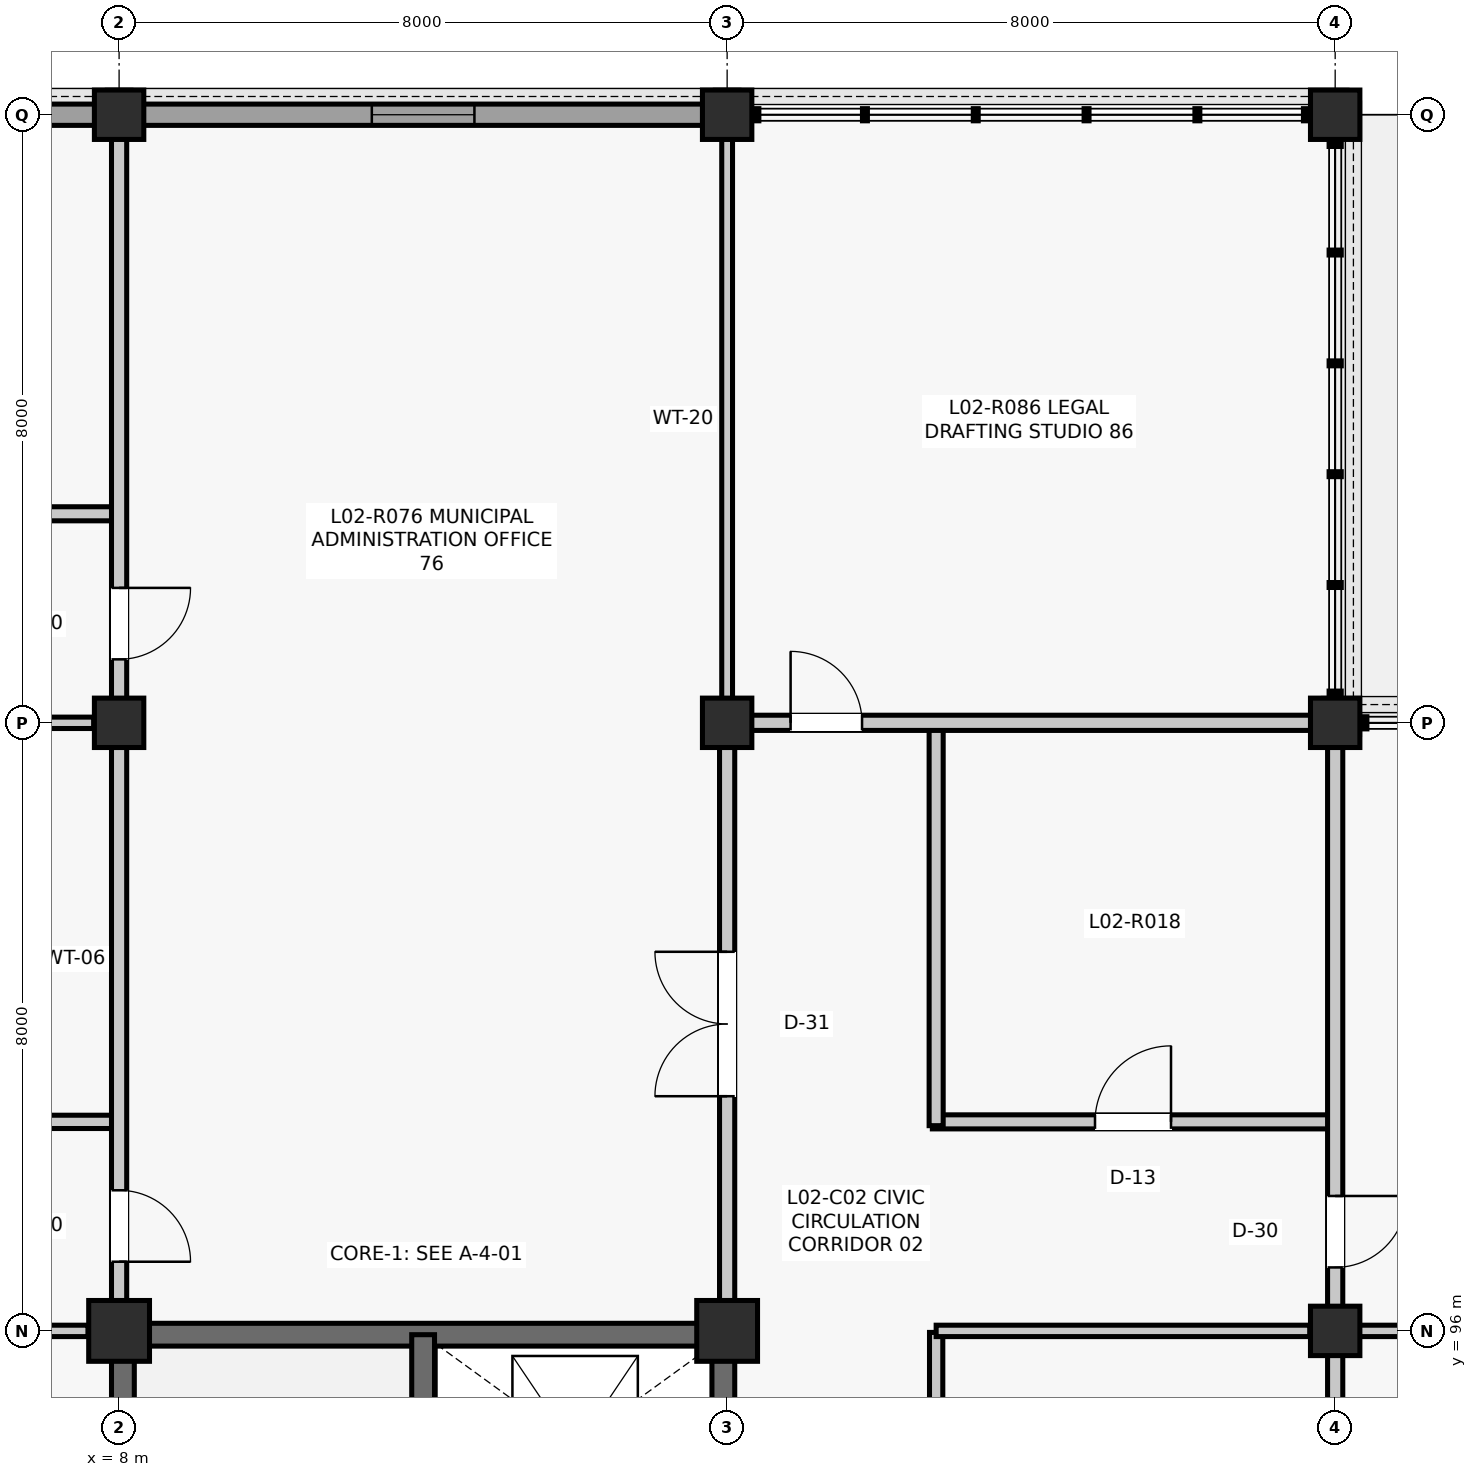
"""IFC4 building model, lengths in metres.
Left out: names, types, materials, properties, quantities, classifications, styles, units other than length and angle.
Written with IfcOpenShell. Run it as: python <this file> out.ifc"""

import sys

from ifc_helpers import new_model, si_unit, direction, frame, frame_2d, origin, origin_2d, place, context, subcontext, project, spatial, rectangle, extrude, element, fill, save


model = new_model("IFC4")
c1 = context("Model", 3, precision=1e-05, world=origin(), true_north=direction((0.0, 1.0)))
c2 = subcontext(c1, "Body", "Model", "MODEL_VIEW")
j1 = project(units=[si_unit("LENGTHUNIT", "METRE"), si_unit("PLANEANGLEUNIT", "RADIAN")], contexts=[c1])
p1 = place(None, origin())
s1 = spatial("IfcSite", under=j1, at=p1, CompositionType="ELEMENT")
p2 = place(p1, origin())
s2 = spatial("IfcBuilding", under=s1, at=p2, CompositionType="ELEMENT")
p3 = place(p2, frame((0.0, 0.0, 9.9)))
s3 = spatial("IfcBuildingStorey", under=s2, at=p3, CompositionType="ELEMENT", Elevation=9.9)
p4 = place(p3, frame((8.0, 96.0, 0.0), z_axis=(0.0, 0.0, 1.0), x_axis=(1.0, 0.0, 0.0)))
e1 = element("IfcColumn", 1, at=p4, inside=s3, PredefinedType="COLUMN", context=c2, shape_type="SweptSolid", body=[
    extrude(rectangle(XDim=0.8, YDim=0.8, at=origin_2d()), origin(), (0.0, 0.0, 1.0), 3.96),
])
for number, where, z_axis, x_axis in (
    (2, (8.0, 104.0, 0.0), (0.0, 0.0, 1.0), (1.0, 0.0, 0.0)),
    (3, (8.0, 112.0, 0.0), (0.0, 0.0, 1.0), (1.0, 0.0, 0.0)),
):
    element("IfcColumn", number, at=place(p3, frame(where, z_axis=z_axis, x_axis=x_axis)), inside=s3, PredefinedType="COLUMN", context=c2, shape_type="SweptSolid", body=[
        extrude(rectangle(XDim=0.65, YDim=0.65, at=origin_2d()), origin(), (0.0, 0.0, 1.0), 3.96),
    ])
p5 = place(p3, frame((16.0, 96.0, 0.0), z_axis=(0.0, 0.0, 1.0), x_axis=(1.0, 0.0, 0.0)))
e4 = element("IfcColumn", 4, at=p5, inside=s3, PredefinedType="COLUMN", context=c2, shape_type="SweptSolid", body=[
    extrude(rectangle(XDim=0.8, YDim=0.8, at=origin_2d()), origin(), (0.0, 0.0, 1.0), 3.96),
])
for number, where, z_axis, x_axis in (
    (5, (16.0, 104.0, 0.0), (0.0, 0.0, 1.0), (1.0, 0.0, 0.0)),
    (6, (16.0, 112.0, 0.0), (0.0, 0.0, 1.0), (1.0, 0.0, 0.0)),
    (7, (24.0, 96.0, 0.0), (0.0, 0.0, 1.0), (1.0, 0.0, 0.0)),
    (8, (24.0, 104.0, 0.0), (0.0, 0.0, 1.0), (1.0, 0.0, 0.0)),
    (9, (24.0, 112.0, 0.0), (0.0, 0.0, 1.0), (1.0, 0.0, 0.0)),
):
    element("IfcColumn", number, at=place(p3, frame(where, z_axis=z_axis, x_axis=x_axis)), inside=s3, PredefinedType="COLUMN", context=c2, shape_type="SweptSolid", body=[
        extrude(rectangle(XDim=0.65, YDim=0.65, at=origin_2d()), origin(), (0.0, 0.0, 1.0), 3.96),
    ])
p6 = place(p3, frame((0.31, 112.0, 0.0), z_axis=(0.0, 0.0, 1.0), x_axis=(1.0, 0.0, 0.0)))
e10 = element("IfcWall", 10, at=p6, inside=s3, PredefinedType="SOLIDWALL", context=c2, shape_type="SweptSolid", body=[
    extrude(rectangle(XDim=7.38, YDim=0.28, at=frame_2d((3.69, 0.0))), origin(), (0.0, 0.0, 1.0), 3.28),
])
p7 = place(p6, frame((0.653, 0.0, 0.95)))
e11 = element("IfcOpeningElement", 11, at=p7, cuts=e10, PredefinedType="OPENING", context=c2, shape_type="SweptSolid", body=[
    extrude(rectangle(XDim=1.35, YDim=1.9, at=frame_2d((0.675, 0.95))), frame((0.0, 0.15, 0.0), z_axis=(0.0, -1.0, 0.0), x_axis=(1.0, 0.0, 0.0)), (0.0, 0.0, 1.0), 0.3),
])
p8 = place(p6, frame((5.377, 0.0, 0.95)))
e12 = element("IfcOpeningElement", 12, at=p8, cuts=e10, PredefinedType="OPENING", context=c2, shape_type="SweptSolid", body=[
    extrude(rectangle(XDim=1.35, YDim=1.9, at=frame_2d((0.675, 0.95))), frame((0.0, 0.15, 0.0), z_axis=(0.0, -1.0, 0.0), x_axis=(1.0, 0.0, 0.0)), (0.0, 0.0, 1.0), 0.3),
])
p9 = place(p3, frame((8.31, 112.0, 0.0), z_axis=(0.0, 0.0, 1.0), x_axis=(1.0, 0.0, 0.0)))
e13 = element("IfcWall", 13, at=p9, inside=s3, PredefinedType="SOLIDWALL", context=c2, shape_type="SweptSolid", body=[
    extrude(rectangle(XDim=7.38, YDim=0.28, at=frame_2d((3.69, 0.0))), origin(), (0.0, 0.0, 1.0), 3.344),
])
p10 = place(p9, frame((3.015, 0.0, 0.9)))
e14 = element("IfcOpeningElement", 14, at=p10, cuts=e13, PredefinedType="OPENING", context=c2, shape_type="SweptSolid", body=[
    extrude(rectangle(XDim=1.35, YDim=1.9, at=frame_2d((0.675, 0.95))), frame((0.0, 0.15, 0.0), z_axis=(0.0, -1.0, 0.0), x_axis=(1.0, 0.0, 0.0)), (0.0, 0.0, 1.0), 0.3),
])
for number, where, z_axis, x_axis in (
    (15, (8.05, 88.29, 0.0), (0.0, 0.0, 1.0), (0.0, 1.0, 0.0)),
    (16, (8.29, 95.95, 0.0), (0.0, 0.0, 1.0), (1.0, 0.0, 0.0)),
):
    element("IfcWall", number, at=place(p3, frame(where, z_axis=z_axis, x_axis=x_axis)), inside=s3, PredefinedType="SHEAR", context=c2, shape_type="SweptSolid", body=[
        extrude(rectangle(XDim=7.42, YDim=0.3, at=frame_2d((3.71, 0.0))), origin(), (0.0, 0.0, 1.0), 3.705),
    ])
p11 = place(p3, frame((15.95, 88.29, 0.0), z_axis=(0.0, 0.0, 1.0), x_axis=(0.0, 1.0, 0.0)))
e17 = element("IfcWall", 17, at=p11, inside=s3, PredefinedType="SHEAR", context=c2, shape_type="SweptSolid", body=[
    extrude(rectangle(XDim=7.42, YDim=0.3, at=frame_2d((3.71, 0.0))), origin(), (0.0, 0.0, 1.0), 3.705),
])
p12 = place(p11, frame((1.6, 0.0, 0.0)))
e18 = element("IfcOpeningElement", 18, at=p12, cuts=e17, PredefinedType="OPENING", context=c2, shape_type="SweptSolid", body=[
    extrude(rectangle(XDim=1.2, YDim=2.15, at=frame_2d((0.6, 1.075))), frame((0.0, 0.16, 0.0), z_axis=(0.0, -1.0, 0.0), x_axis=(1.0, 0.0, 0.0)), (0.0, 0.0, 1.0), 0.32),
])
p13 = place(p3, frame((12.0, 88.05, 0.0), z_axis=(0.0, 0.0, 1.0), x_axis=(0.0, 1.0, 0.0)))
e19 = element("IfcWall", 19, at=p13, inside=s3, PredefinedType="SHEAR", context=c2, shape_type="SweptSolid", body=[
    extrude(rectangle(XDim=7.9, YDim=0.3, at=frame_2d((3.95, 0.0))), origin(), (0.0, 0.0, 1.0), 3.705),
])
p14 = place(p13, frame((0.55, 0.0, 0.0)))
e20 = element("IfcOpeningElement", 20, at=p14, cuts=e19, PredefinedType="OPENING", context=c2, shape_type="SweptSolid", body=[
    extrude(rectangle(XDim=1.1, YDim=2.15, at=frame_2d((0.55, 1.075))), frame((0.0, 0.16, 0.0), z_axis=(0.0, -1.0, 0.0), x_axis=(1.0, 0.0, 0.0)), (0.0, 0.0, 1.0), 0.32),
])
p15 = place(p3, frame((2.75, 96.0, 0.0), z_axis=(0.0, 0.0, 1.0), x_axis=(1.0, 0.0, 0.0)))
e21 = element("IfcWall", 21, at=p15, inside=s3, PredefinedType="PARTITIONING", context=c2, shape_type="SweptSolid", body=[
    extrude(rectangle(XDim=4.84, YDim=0.15, at=frame_2d((2.42, 0.0))), origin(), (0.0, 0.0, 1.0), 3.082),
])
p16 = place(p3, frame((2.7, 98.75, 0.0), z_axis=(0.0, 0.0, 1.0), x_axis=(1.0, 0.0, 0.0)))
e22 = element("IfcWall", 22, at=p16, inside=s3, PredefinedType="PARTITIONING", context=c2, shape_type="SweptSolid", body=[
    extrude(rectangle(XDim=5.28, YDim=0.175, at=frame_2d((2.64, 0.0))), origin(), (0.0, 0.0, 1.0), 3.227),
])
p17 = place(p16, frame((2.115, 0.0, 0.0)))
e23 = element("IfcOpeningElement", 23, at=p17, cuts=e22, PredefinedType="OPENING", context=c2, shape_type="SweptSolid", body=[
    extrude(rectangle(XDim=1.05, YDim=2.15, at=frame_2d((0.525, 1.075))), frame((0.0, 0.097, 0.0), z_axis=(0.0, -1.0, 0.0), x_axis=(1.0, 0.0, 0.0)), (0.0, 0.0, 1.0), 0.195),
])
p18 = place(p3, frame((2.75, 104.0, 0.0), z_axis=(0.0, 0.0, 1.0), x_axis=(1.0, 0.0, 0.0)))
e24 = element("IfcWall", 24, at=p18, inside=s3, PredefinedType="PARTITIONING", context=c2, shape_type="SweptSolid", body=[
    extrude(rectangle(XDim=4.915, YDim=0.15, at=frame_2d((2.458, 0.0))), origin(), (0.0, 0.0, 1.0), 3.157),
])
p19 = place(p3, frame((2.7, 106.75, 0.0), z_axis=(0.0, 0.0, 1.0), x_axis=(1.0, 0.0, 0.0)))
e25 = element("IfcWall", 25, at=p19, inside=s3, PredefinedType="PARTITIONING", context=c2, shape_type="SweptSolid", body=[
    extrude(rectangle(XDim=5.28, YDim=0.185, at=frame_2d((2.64, 0.0))), origin(), (0.0, 0.0, 1.0), 3.151),
])
p20 = place(p19, frame((2.14, 0.0, 0.0)))
e26 = element("IfcOpeningElement", 26, at=p20, cuts=e25, PredefinedType="OPENING", context=c2, shape_type="SweptSolid", body=[
    extrude(rectangle(XDim=1.0, YDim=2.15, at=frame_2d((0.5, 1.075))), frame((0.0, 0.103, 0.0), z_axis=(0.0, -1.0, 0.0), x_axis=(1.0, 0.0, 0.0)), (0.0, 0.0, 1.0), 0.205),
])
p21 = place(p3, frame((18.75, 90.7, 0.0), z_axis=(0.0, 0.0, 1.0), x_axis=(0.0, 1.0, 0.0)))
e27 = element("IfcWall", 27, at=p21, inside=s3, PredefinedType="PARTITIONING", context=c2, shape_type="SweptSolid", body=[
    extrude(rectangle(XDim=5.28, YDim=0.175, at=frame_2d((2.64, 0.0))), origin(), (0.0, 0.0, 1.0), 3.141),
])
p22 = place(p3, frame((18.75, 96.0, 0.0), z_axis=(0.0, 0.0, 1.0), x_axis=(1.0, 0.0, 0.0)))
e28 = element("IfcWall", 28, at=p22, inside=s3, PredefinedType="PARTITIONING", context=c2, shape_type="SweptSolid", body=[
    extrude(rectangle(XDim=4.915, YDim=0.15, at=frame_2d((2.458, 0.0))), origin(), (0.0, 0.0, 1.0), 3.141),
])
p23 = place(p3, frame((18.7, 98.75, 0.0), z_axis=(0.0, 0.0, 1.0), x_axis=(1.0, 0.0, 0.0)))
e29 = element("IfcWall", 29, at=p23, inside=s3, PredefinedType="PARTITIONING", context=c2, shape_type="SweptSolid", body=[
    extrude(rectangle(XDim=5.28, YDim=0.185, at=frame_2d((2.64, 0.0))), origin(), (0.0, 0.0, 1.0), 3.221),
])
p24 = place(p23, frame((2.14, 0.0, 0.0)))
e30 = element("IfcOpeningElement", 30, at=p24, cuts=e29, PredefinedType="OPENING", context=c2, shape_type="SweptSolid", body=[
    extrude(rectangle(XDim=1.0, YDim=2.15, at=frame_2d((0.5, 1.075))), frame((0.0, 0.103, 0.0), z_axis=(0.0, -1.0, 0.0), x_axis=(1.0, 0.0, 0.0)), (0.0, 0.0, 1.0), 0.205),
])
p25 = place(p3, frame((18.75, 98.7, 0.0), z_axis=(0.0, 0.0, 1.0), x_axis=(0.0, 1.0, 0.0)))
e31 = element("IfcWall", 31, at=p25, inside=s3, PredefinedType="PARTITIONING", context=c2, shape_type="SweptSolid", body=[
    extrude(rectangle(XDim=5.28, YDim=0.185, at=frame_2d((2.64, 0.0))), origin(), (0.0, 0.0, 1.0), 3.151),
])
p26 = place(p3, frame((8.0, 96.39, 0.0), z_axis=(0.0, 0.0, 1.0), x_axis=(0.0, 1.0, 0.0)))
e32 = element("IfcWall", 32, at=p26, inside=s3, PredefinedType="PARTITIONING", context=c2, shape_type="SweptSolid", body=[
    extrude(rectangle(XDim=7.295, YDim=0.2, at=frame_2d((3.647, 0.0))), origin(), (0.0, 0.0, 1.0), 3.227),
])
p27 = place(p26, frame((0.52, 0.0, 0.0)))
e33 = element("IfcOpeningElement", 33, at=p27, cuts=e32, PredefinedType="OPENING", context=c2, shape_type="SweptSolid", body=[
    extrude(rectangle(XDim=0.94, YDim=2.12, at=frame_2d((0.47, 1.06))), frame((0.0, 0.11, 0.0), z_axis=(0.0, -1.0, 0.0), x_axis=(1.0, 0.0, 0.0)), (0.0, 0.0, 1.0), 0.22),
])
p28 = place(p3, frame((8.0, 104.315, 0.0), z_axis=(0.0, 0.0, 1.0), x_axis=(0.0, 1.0, 0.0)))
e34 = element("IfcWall", 34, at=p28, inside=s3, PredefinedType="PARTITIONING", context=c2, shape_type="SweptSolid", body=[
    extrude(rectangle(XDim=7.37, YDim=0.2, at=frame_2d((3.685, 0.0))), origin(), (0.0, 0.0, 1.0), 3.151),
])
p29 = place(p28, frame((0.52, 0.0, 0.0)))
e35 = element("IfcOpeningElement", 35, at=p29, cuts=e34, PredefinedType="OPENING", context=c2, shape_type="SweptSolid", body=[
    extrude(rectangle(XDim=0.94, YDim=2.12, at=frame_2d((0.47, 1.06))), frame((0.0, 0.11, 0.0), z_axis=(0.0, -1.0, 0.0), x_axis=(1.0, 0.0, 0.0)), (0.0, 0.0, 1.0), 0.22),
])
p30 = place(p3, frame((16.0, 96.39, 0.0), z_axis=(0.0, 0.0, 1.0), x_axis=(0.0, 1.0, 0.0)))
e36 = element("IfcWall", 36, at=p30, inside=s3, PredefinedType="PARTITIONING", context=c2, shape_type="SweptSolid", body=[
    extrude(rectangle(XDim=7.295, YDim=0.2, at=frame_2d((3.647, 0.0))), origin(), (0.0, 0.0, 1.0), 3.151),
])
p31 = place(p30, frame((2.698, 0.0, 0.0)))
e37 = element("IfcOpeningElement", 37, at=p31, cuts=e36, PredefinedType="OPENING", context=c2, shape_type="SweptSolid", body=[
    extrude(rectangle(XDim=1.9, YDim=2.38, at=frame_2d((0.95, 1.19))), frame((0.0, 0.11, 0.0), z_axis=(0.0, -1.0, 0.0), x_axis=(1.0, 0.0, 0.0)), (0.0, 0.0, 1.0), 0.22),
])
p32 = place(p3, frame((16.0, 104.315, 0.0), z_axis=(0.0, 0.0, 1.0), x_axis=(0.0, 1.0, 0.0)))
e38 = element("IfcWall", 38, at=p32, inside=s3, PredefinedType="PARTITIONING", context=c2, shape_type="SweptSolid", body=[
    extrude(rectangle(XDim=7.37, YDim=0.142, at=frame_2d((3.685, 0.0))), origin(), (0.0, 0.0, 1.0), 3.221),
])
p33 = place(p3, frame((24.0, 88.315, 0.0), z_axis=(0.0, 0.0, 1.0), x_axis=(0.0, 1.0, 0.0)))
e39 = element("IfcWall", 39, at=p33, inside=s3, PredefinedType="PARTITIONING", context=c2, shape_type="SweptSolid", body=[
    extrude(rectangle(XDim=7.37, YDim=0.2, at=frame_2d((3.685, 0.0))), origin(), (0.0, 0.0, 1.0), 3.151),
])
p34 = place(p33, frame((0.52, 0.0, 0.0)))
e40 = element("IfcOpeningElement", 40, at=p34, cuts=e39, PredefinedType="OPENING", context=c2, shape_type="SweptSolid", body=[
    extrude(rectangle(XDim=0.94, YDim=2.12, at=frame_2d((0.47, 1.06))), frame((0.0, 0.11, 0.0), z_axis=(0.0, -1.0, 0.0), x_axis=(1.0, 0.0, 0.0)), (0.0, 0.0, 1.0), 0.22),
])
p35 = place(p3, frame((24.0, 96.315, 0.0), z_axis=(0.0, 0.0, 1.0), x_axis=(0.0, 1.0, 0.0)))
e41 = element("IfcWall", 41, at=p35, inside=s3, PredefinedType="PARTITIONING", context=c2, shape_type="SweptSolid", body=[
    extrude(rectangle(XDim=7.37, YDim=0.2, at=frame_2d((3.685, 0.0))), origin(), (0.0, 0.0, 1.0), 3.221),
])
p36 = place(p35, frame((0.52, 0.0, 0.0)))
e42 = element("IfcOpeningElement", 42, at=p36, cuts=e41, PredefinedType="OPENING", context=c2, shape_type="SweptSolid", body=[
    extrude(rectangle(XDim=0.94, YDim=2.12, at=frame_2d((0.47, 1.06))), frame((0.0, 0.11, 0.0), z_axis=(0.0, -1.0, 0.0), x_axis=(1.0, 0.0, 0.0)), (0.0, 0.0, 1.0), 0.22),
])
p37 = place(p3, frame((16.315, 104.0, 0.0), z_axis=(0.0, 0.0, 1.0), x_axis=(1.0, 0.0, 0.0)))
e43 = element("IfcWall", 43, at=p37, inside=s3, PredefinedType="PARTITIONING", context=c2, shape_type="SweptSolid", body=[
    extrude(rectangle(XDim=7.37, YDim=0.2, at=frame_2d((3.685, 0.0))), origin(), (0.0, 0.0, 1.0), 3.151),
])
p38 = place(p37, frame((0.52, 0.0, 0.0)))
e44 = element("IfcOpeningElement", 44, at=p38, cuts=e43, PredefinedType="OPENING", context=c2, shape_type="SweptSolid", body=[
    extrude(rectangle(XDim=0.94, YDim=2.12, at=frame_2d((0.47, 1.06))), frame((0.0, 0.11, 0.0), z_axis=(0.0, -1.0, 0.0), x_axis=(1.0, 0.0, 0.0)), (0.0, 0.0, 1.0), 0.22),
])
p39 = place(p3, frame((24.315, 96.0, 0.0), z_axis=(0.0, 0.0, 1.0), x_axis=(1.0, 0.0, 0.0)))
e45 = element("IfcWall", 45, at=p39, inside=s3, PredefinedType="PARTITIONING", context=c2, shape_type="SweptSolid", body=[
    extrude(rectangle(XDim=7.295, YDim=0.15, at=frame_2d((3.647, 0.0))), origin(), (0.0, 0.0, 1.0), 3.151),
])
p40 = place(p10, origin())
e46 = element("IfcWindow", 46, at=p40, inside=s3, PartitioningType="SINGLE_PANEL", PredefinedType="WINDOW", context=c2, shape_type="SweptSolid", body=[
    extrude(rectangle(XDim=1.35, YDim=1.9, at=frame_2d((0.675, 0.95))), frame((0.0, 0.03, 0.0), z_axis=(0.0, -1.0, 0.0), x_axis=(1.0, 0.0, 0.0)), (0.0, 0.0, 1.0), 0.06),
])
fill(e14, e46)
p41 = place(p24, origin())
e47 = element("IfcDoor", 47, at=p41, inside=s3, OperationType="SINGLE_SWING_RIGHT", PredefinedType="DOOR", context=c2, shape_type="SweptSolid", body=[
    extrude(rectangle(XDim=1.0, YDim=2.15, at=frame_2d((0.5, 1.075))), frame((0.0, 0.025, 0.0), z_axis=(0.0, -1.0, 0.0), x_axis=(1.0, 0.0, 0.0)), (0.0, 0.0, 1.0), 0.05),
])
fill(e30, e47)
p42 = place(p27, frame((0.94, 0.0, 0.0), z_axis=(0.0, 0.0, 1.0), x_axis=(-1.0, 0.0, 0.0)))
e48 = element("IfcDoor", 48, at=p42, inside=s3, OperationType="SINGLE_SWING_LEFT", PredefinedType="DOOR", context=c2, shape_type="SweptSolid", body=[
    extrude(rectangle(XDim=0.94, YDim=2.12, at=frame_2d((0.47, 1.06))), frame((0.0, 0.025, 0.0), z_axis=(0.0, -1.0, 0.0), x_axis=(1.0, 0.0, 0.0)), (0.0, 0.0, 1.0), 0.05),
])
fill(e33, e48)
p43 = place(p29, frame((0.94, 0.0, 0.0), z_axis=(0.0, 0.0, 1.0), x_axis=(-1.0, 0.0, 0.0)))
e49 = element("IfcDoor", 49, at=p43, inside=s3, OperationType="SINGLE_SWING_RIGHT", PredefinedType="DOOR", context=c2, shape_type="SweptSolid", body=[
    extrude(rectangle(XDim=0.94, YDim=2.12, at=frame_2d((0.47, 1.06))), frame((0.0, 0.025, 0.0), z_axis=(0.0, -1.0, 0.0), x_axis=(1.0, 0.0, 0.0)), (0.0, 0.0, 1.0), 0.05),
])
fill(e35, e49)
p44 = place(p31, origin())
e50 = element("IfcDoor", 50, at=p44, inside=s3, OperationType="DOUBLE_DOOR_SINGLE_SWING", PredefinedType="DOOR", context=c2, shape_type="SweptSolid", body=[
    extrude(rectangle(XDim=1.9, YDim=2.38, at=frame_2d((0.95, 1.19))), frame((0.0, 0.025, 0.0), z_axis=(0.0, -1.0, 0.0), x_axis=(1.0, 0.0, 0.0)), (0.0, 0.0, 1.0), 0.05),
])
fill(e37, e50)
p45 = place(p36, frame((0.94, 0.0, 0.0), z_axis=(0.0, 0.0, 1.0), x_axis=(-1.0, 0.0, 0.0)))
e51 = element("IfcDoor", 51, at=p45, inside=s3, OperationType="SINGLE_SWING_RIGHT", PredefinedType="DOOR", context=c2, shape_type="SweptSolid", body=[
    extrude(rectangle(XDim=0.94, YDim=2.12, at=frame_2d((0.47, 1.06))), frame((0.0, 0.025, 0.0), z_axis=(0.0, -1.0, 0.0), x_axis=(1.0, 0.0, 0.0)), (0.0, 0.0, 1.0), 0.05),
])
fill(e42, e51)
p46 = place(p38, origin())
e52 = element("IfcDoor", 52, at=p46, inside=s3, OperationType="SINGLE_SWING_LEFT", PredefinedType="DOOR", context=c2, shape_type="SweptSolid", body=[
    extrude(rectangle(XDim=0.94, YDim=2.12, at=frame_2d((0.47, 1.06))), frame((0.0, 0.025, 0.0), z_axis=(0.0, -1.0, 0.0), x_axis=(1.0, 0.0, 0.0)), (0.0, 0.0, 1.0), 0.05),
])
fill(e44, e52)
save(model, sys.argv[1])
